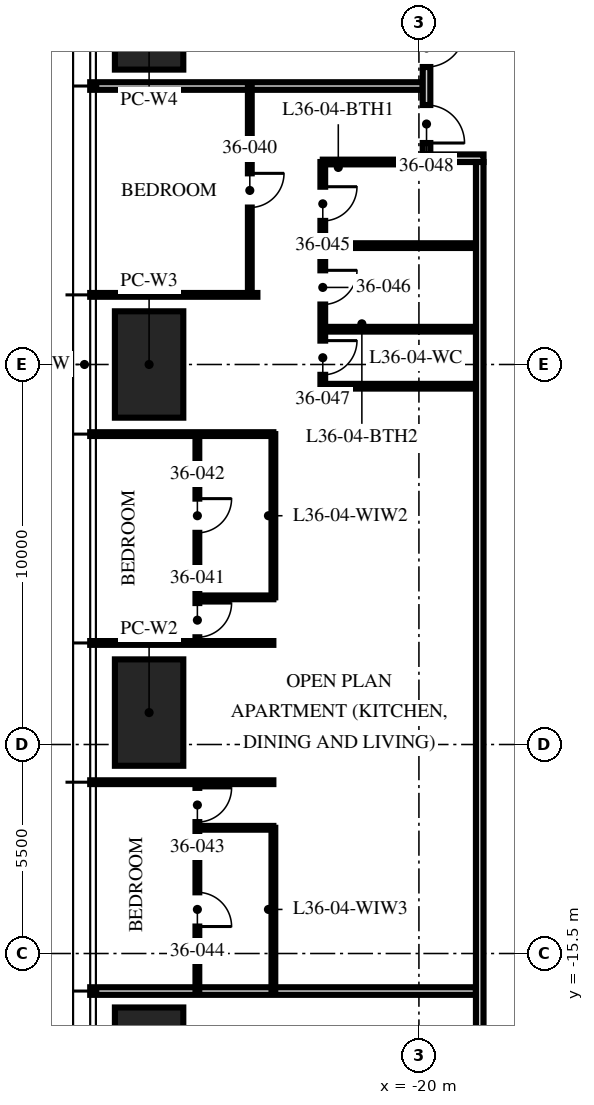
"""IFC4 building model, lengths in metres.
Left out: names, types, materials, properties, quantities, classifications, styles, units other than length and angle.
Written with IfcOpenShell. Run it as: python <this file> out.ifc"""

import sys

from ifc_helpers import new_model, si_unit, direction, frame, frame_2d, origin, origin_2d, place, context, subcontext, project, spatial, rectangle, extrude, element, fill, save


model = new_model("IFC4")
c1 = context("Model", 3, precision=1e-05, world=origin(), true_north=direction((0.0, 1.0)))
c2 = subcontext(c1, "Body", "Model", "MODEL_VIEW")
j1 = project(units=[si_unit("LENGTHUNIT", "METRE"), si_unit("PLANEANGLEUNIT", "RADIAN")], contexts=[c1])
p1 = place(None, origin())
s1 = spatial("IfcSite", under=j1, at=p1, CompositionType="ELEMENT")
p2 = place(p1, origin())
s2 = spatial("IfcBuilding", under=s1, at=p2, CompositionType="ELEMENT")
p3 = place(p2, frame((0.0, 0.0, 144.75)))
s3 = spatial("IfcBuildingStorey", under=s2, at=p3, CompositionType="ELEMENT", Elevation=144.75)
for number, where, z_axis, x_axis in (
    (1, (-27.1, -18.32, 0.0), (0.0, 0.0, 1.0), (0.0, 1.0, 0.0)),
    (2, (-27.1, -9.16, 0.0), (0.0, 0.0, 1.0), (0.0, 1.0, 0.0)),
    (3, (-27.1, 0.0, 0.0), (0.0, 0.0, 1.0), (0.0, 1.0, 0.0)),
    (4, (-27.1, 9.16, 0.0), (0.0, 0.0, 1.0), (0.0, 1.0, 0.0)),
):
    element("IfcColumn", number, at=place(p3, frame(where, z_axis=z_axis, x_axis=x_axis)), inside=s3, PredefinedType="COLUMN", context=c2, shape_type="SweptSolid", body=[
        extrude(rectangle(XDim=2.8, YDim=1.8, at=origin_2d()), origin(), (0.0, 0.0, 1.0), 3.75),
    ])
p4 = place(p3, frame((-19.9, 7.328, 0.0), z_axis=(0.0, 0.0, 1.0), x_axis=(-1.0, 0.0, 0.0)))
e5 = element("IfcWall", 5, at=p4, inside=s3, PredefinedType="PARTITIONING", context=c2, shape_type="SweptSolid", body=[
    extrude(rectangle(XDim=8.75, YDim=0.2, at=frame_2d((4.375, 0.0))), origin(), (0.0, 0.0, 1.0), 2.81),
])
p5 = place(p3, frame((-24.25, 1.832, 0.0), z_axis=(0.0, 0.0, 1.0), x_axis=(-1.0, 0.0, 0.0)))
e6 = element("IfcWall", 6, at=p5, inside=s3, PredefinedType="PARTITIONING", context=c2, shape_type="SweptSolid", body=[
    extrude(rectangle(XDim=4.4, YDim=0.1, at=frame_2d((2.2, 0.0))), origin(), (0.0, 0.0, 1.0), 2.81),
])
for number, where, z_axis, x_axis in (
    (7, (-23.83, -1.832, 0.0), (0.0, 0.0, 1.0), (-1.0, 0.0, 0.0)),
    (8, (-23.83, -7.328, 0.0), (0.0, 0.0, 1.0), (-1.0, 0.0, 0.0)),
    (9, (-23.83, -10.992, 0.0), (0.0, 0.0, 1.0), (-1.0, 0.0, 0.0)),
):
    element("IfcWall", number, at=place(p3, frame(where, z_axis=z_axis, x_axis=x_axis)), inside=s3, PredefinedType="PARTITIONING", context=c2, shape_type="SweptSolid", body=[
        extrude(rectangle(XDim=4.82, YDim=0.1, at=frame_2d((2.41, 0.0))), origin(), (0.0, 0.0, 1.0), 2.81),
    ])
p6 = place(p3, frame((-18.5, -16.488, 0.0), z_axis=(0.0, 0.0, 1.0), x_axis=(-1.0, 0.0, 0.0)))
e10 = element("IfcWall", 10, at=p6, inside=s3, PredefinedType="PARTITIONING", context=c2, shape_type="SweptSolid", body=[
    extrude(rectangle(XDim=10.15, YDim=0.2, at=frame_2d((5.075, 0.0))), origin(), (0.0, 0.0, 1.0), 2.81),
])
p7 = place(p3, frame((-24.45, 7.328, 0.0), z_axis=(0.0, 0.0, 1.0), x_axis=(0.0, -1.0, 0.0)))
e11 = element("IfcWall", 11, at=p7, inside=s3, PredefinedType="PARTITIONING", context=c2, shape_type="SweptSolid", body=[
    extrude(rectangle(XDim=5.496, YDim=0.1, at=frame_2d((2.748, 0.0))), origin(), (0.0, 0.0, 1.0), 2.81),
])
p8 = place(p7, frame((2.298, 0.0, 0.0)))
e12 = element("IfcOpeningElement", 12, at=p8, cuts=e11, PredefinedType="OPENING", context=c2, shape_type="SweptSolid", body=[
    extrude(rectangle(XDim=0.9, YDim=2.1, at=frame_2d((0.45, 1.05))), frame((0.0, 0.06, 0.0), z_axis=(0.0, -1.0, 0.0), x_axis=(1.0, 0.0, 0.0)), (0.0, 0.0, 1.0), 0.12),
])
p9 = place(p3, frame((-25.83, -1.832, 0.0), z_axis=(0.0, 0.0, 1.0), x_axis=(0.0, -1.0, 0.0)))
e13 = element("IfcWall", 13, at=p9, inside=s3, PredefinedType="PARTITIONING", context=c2, shape_type="SweptSolid", body=[
    extrude(rectangle(XDim=5.496, YDim=0.1, at=frame_2d((2.748, 0.0))), origin(), (0.0, 0.0, 1.0), 2.81),
])
p10 = place(p9, frame((4.446, 0.0, 0.0)))
e14 = element("IfcOpeningElement", 14, at=p10, cuts=e13, PredefinedType="OPENING", context=c2, shape_type="SweptSolid", body=[
    extrude(rectangle(XDim=0.9, YDim=2.1, at=frame_2d((0.45, 1.05))), frame((0.0, 0.06, 0.0), z_axis=(0.0, -1.0, 0.0), x_axis=(1.0, 0.0, 0.0)), (0.0, 0.0, 1.0), 0.12),
])
p11 = place(p9, frame((1.698, 0.0, 0.0)))
e15 = element("IfcOpeningElement", 15, at=p11, cuts=e13, PredefinedType="OPENING", context=c2, shape_type="SweptSolid", body=[
    extrude(rectangle(XDim=0.9, YDim=2.1, at=frame_2d((0.45, 1.05))), frame((0.0, 0.06, 0.0), z_axis=(0.0, -1.0, 0.0), x_axis=(1.0, 0.0, 0.0)), (0.0, 0.0, 1.0), 0.12),
])
p12 = place(p3, frame((-23.83, -6.128, 0.0), z_axis=(0.0, 0.0, 1.0), x_axis=(-1.0, 0.0, 0.0)))
e16 = element("IfcWall", 16, at=p12, inside=s3, PredefinedType="PARTITIONING", context=c2, shape_type="SweptSolid", body=[
    extrude(rectangle(XDim=2.0, YDim=0.1, at=frame_2d((1.0, 0.0))), origin(), (0.0, 0.0, 1.0), 3.5),
])
p13 = place(p3, frame((-23.83, -1.832, 0.0), z_axis=(0.0, 0.0, 1.0), x_axis=(0.0, -1.0, 0.0)))
e17 = element("IfcWall", 17, at=p13, inside=s3, PredefinedType="PARTITIONING", context=c2, shape_type="SweptSolid", body=[
    extrude(rectangle(XDim=4.296, YDim=0.1, at=frame_2d((2.148, 0.0))), origin(), (0.0, 0.0, 1.0), 2.81),
])
p14 = place(p3, frame((-25.83, -10.992, 0.0), z_axis=(0.0, 0.0, 1.0), x_axis=(0.0, -1.0, 0.0)))
e18 = element("IfcWall", 18, at=p14, inside=s3, PredefinedType="PARTITIONING", context=c2, shape_type="SweptSolid", body=[
    extrude(rectangle(XDim=5.496, YDim=0.1, at=frame_2d((2.748, 0.0))), origin(), (0.0, 0.0, 1.0), 2.81),
])
p15 = place(p14, frame((0.15, 0.0, 0.0)))
e19 = element("IfcOpeningElement", 19, at=p15, cuts=e18, PredefinedType="OPENING", context=c2, shape_type="SweptSolid", body=[
    extrude(rectangle(XDim=0.9, YDim=2.1, at=frame_2d((0.45, 1.05))), frame((0.0, 0.06, 0.0), z_axis=(0.0, -1.0, 0.0), x_axis=(1.0, 0.0, 0.0)), (0.0, 0.0, 1.0), 0.12),
])
p16 = place(p14, frame((2.898, 0.0, 0.0)))
e20 = element("IfcOpeningElement", 20, at=p16, cuts=e18, PredefinedType="OPENING", context=c2, shape_type="SweptSolid", body=[
    extrude(rectangle(XDim=0.9, YDim=2.1, at=frame_2d((0.45, 1.05))), frame((0.0, 0.06, 0.0), z_axis=(0.0, -1.0, 0.0), x_axis=(1.0, 0.0, 0.0)), (0.0, 0.0, 1.0), 0.12),
])
p17 = place(p3, frame((-23.83, -12.192, 0.0), z_axis=(0.0, 0.0, 1.0), x_axis=(-1.0, 0.0, 0.0)))
e21 = element("IfcWall", 21, at=p17, inside=s3, PredefinedType="PARTITIONING", context=c2, shape_type="SweptSolid", body=[
    extrude(rectangle(XDim=2.0, YDim=0.1, at=frame_2d((1.0, 0.0))), origin(), (0.0, 0.0, 1.0), 3.5),
])
p18 = place(p3, frame((-23.83, -12.192, 0.0), z_axis=(0.0, 0.0, 1.0), x_axis=(0.0, -1.0, 0.0)))
e22 = element("IfcWall", 22, at=p18, inside=s3, PredefinedType="PARTITIONING", context=c2, shape_type="SweptSolid", body=[
    extrude(rectangle(XDim=4.296, YDim=0.1, at=frame_2d((2.148, 0.0))), origin(), (0.0, 0.0, 1.0), 2.81),
])
p19 = place(p3, frame((-22.53, 5.328, 0.0), z_axis=(0.0, 0.0, 1.0), x_axis=(0.0, -1.0, 0.0)))
e23 = element("IfcWall", 23, at=p19, inside=s3, PredefinedType="PARTITIONING", context=c2, shape_type="SweptSolid", body=[
    extrude(rectangle(XDim=5.9, YDim=0.125, at=frame_2d((2.95, 0.0))), origin(), (0.0, 0.0, 1.0), 2.7),
])
p20 = place(p19, frame((0.65, 0.0, 0.0)))
e24 = element("IfcOpeningElement", 24, at=p20, cuts=e23, PredefinedType="OPENING", context=c2, shape_type="SweptSolid", body=[
    extrude(rectangle(XDim=0.9, YDim=2.1, at=frame_2d((0.45, 1.05))), frame((0.0, 0.073, 0.0), z_axis=(0.0, -1.0, 0.0), x_axis=(1.0, 0.0, 0.0)), (0.0, 0.0, 1.0), 0.145),
])
p21 = place(p19, frame((2.85, 0.0, 0.0)))
e25 = element("IfcOpeningElement", 25, at=p21, cuts=e23, PredefinedType="OPENING", context=c2, shape_type="SweptSolid", body=[
    extrude(rectangle(XDim=0.9, YDim=2.1, at=frame_2d((0.45, 1.05))), frame((0.0, 0.073, 0.0), z_axis=(0.0, -1.0, 0.0), x_axis=(1.0, 0.0, 0.0)), (0.0, 0.0, 1.0), 0.145),
])
p22 = place(p19, frame((4.7, 0.0, 0.0)))
e26 = element("IfcOpeningElement", 26, at=p22, cuts=e23, PredefinedType="OPENING", context=c2, shape_type="SweptSolid", body=[
    extrude(rectangle(XDim=0.9, YDim=2.1, at=frame_2d((0.45, 1.05))), frame((0.0, 0.073, 0.0), z_axis=(0.0, -1.0, 0.0), x_axis=(1.0, 0.0, 0.0)), (0.0, 0.0, 1.0), 0.145),
])
p23 = place(p3, frame((-19.97, 5.328, 0.0), z_axis=(0.0, 0.0, 1.0), x_axis=(-1.0, 0.0, 0.0)))
e27 = element("IfcWall", 27, at=p23, inside=s3, PredefinedType="PARTITIONING", context=c2, shape_type="SweptSolid", body=[
    extrude(rectangle(XDim=2.56, YDim=0.125, at=frame_2d((1.28, 0.0))), origin(), (0.0, 0.0, 1.0), 3.5),
])
for number, where, z_axis, x_axis in (
    (28, (-18.5, 3.128, 0.0), (0.0, 0.0, 1.0), (-1.0, 0.0, 0.0)),
    (29, (-18.5, 0.928, 0.0), (0.0, 0.0, 1.0), (-1.0, 0.0, 0.0)),
    (30, (-18.5, -0.572, 0.0), (0.0, 0.0, 1.0), (-1.0, 0.0, 0.0)),
):
    element("IfcWall", number, at=place(p3, frame(where, z_axis=z_axis, x_axis=x_axis)), inside=s3, PredefinedType="PARTITIONING", context=c2, shape_type="SweptSolid", body=[
        extrude(rectangle(XDim=4.03, YDim=0.125, at=frame_2d((2.015, 0.0))), origin(), (0.0, 0.0, 1.0), 3.5),
    ])
p24 = place(p3, frame((-18.3, 5.428, 0.0), z_axis=(0.0, 0.0, 1.0), x_axis=(-1.0, 0.0, 0.0)))
e31 = element("IfcWall", 31, at=p24, inside=s3, PredefinedType="PARTITIONING", context=c2, shape_type="SweptSolid", body=[
    extrude(rectangle(XDim=1.6, YDim=0.2, at=frame_2d((0.8, 0.0))), origin(), (0.0, 0.0, 1.0), 3.5),
])
p25 = place(p3, frame((-19.8, 9.128, 0.0), z_axis=(0.0, 0.0, 1.0), x_axis=(0.0, -1.0, 0.0)))
e32 = element("IfcWall", 32, at=p25, inside=s3, PredefinedType="PARTITIONING", context=c2, shape_type="SweptSolid", body=[
    extrude(rectangle(XDim=3.6, YDim=0.2, at=frame_2d((1.8, 0.0))), origin(), (0.0, 0.0, 1.0), 2.7),
])
p26 = place(p25, frame((0.3, 0.0, 0.0)))
e33 = element("IfcOpeningElement", 33, at=p26, cuts=e32, PredefinedType="OPENING", context=c2, shape_type="SweptSolid", body=[
    extrude(rectangle(XDim=1.0, YDim=2.2, at=frame_2d((0.5, 1.1))), frame((0.0, 0.11, 0.0), z_axis=(0.0, -1.0, 0.0), x_axis=(1.0, 0.0, 0.0)), (0.0, 0.0, 1.0), 0.22),
])
p27 = place(p25, frame((2.3, 0.0, 0.0)))
e34 = element("IfcOpeningElement", 34, at=p27, cuts=e32, PredefinedType="OPENING", context=c2, shape_type="SweptSolid", body=[
    extrude(rectangle(XDim=1.0, YDim=2.2, at=frame_2d((0.5, 1.1))), frame((0.0, 0.11, 0.0), z_axis=(0.0, -1.0, 0.0), x_axis=(1.0, 0.0, 0.0)), (0.0, 0.0, 1.0), 0.22),
])
p28 = place(p3, frame((-18.4, 5.328, 0.0), z_axis=(0.0, 0.0, 1.0), x_axis=(0.0, -1.0, 0.0)))
e35 = element("IfcWall", 35, at=p28, inside=s3, PredefinedType="PARTITIONING", context=c2, shape_type="SweptSolid", body=[
    extrude(rectangle(XDim=23.628, YDim=0.2, at=frame_2d((11.814, 0.0))), origin(), (0.0, 0.0, 1.0), 2.3),
])
p29 = place(p26, origin())
e36 = element("IfcDoor", 36, at=p29, inside=s3, OperationType="SINGLE_SWING_LEFT", PredefinedType="DOOR", context=c2, shape_type="SweptSolid", body=[
    extrude(rectangle(XDim=1.0, YDim=2.2, at=frame_2d((0.5, 1.1))), frame((0.0, 0.025, 0.0), z_axis=(0.0, -1.0, 0.0), x_axis=(1.0, 0.0, 0.0)), (0.0, 0.0, 1.0), 0.05),
])
fill(e33, e36)
p30 = place(p8, origin())
e37 = element("IfcDoor", 37, at=p30, inside=s3, OperationType="SINGLE_SWING_LEFT", PredefinedType="DOOR", context=c2, shape_type="SweptSolid", body=[
    extrude(rectangle(XDim=0.9, YDim=2.1, at=frame_2d((0.45, 1.05))), frame((0.0, 0.025, 0.0), z_axis=(0.0, -1.0, 0.0), x_axis=(1.0, 0.0, 0.0)), (0.0, 0.0, 1.0), 0.05),
])
fill(e12, e37)
p31 = place(p10, origin())
e38 = element("IfcDoor", 38, at=p31, inside=s3, OperationType="SINGLE_SWING_LEFT", PredefinedType="DOOR", context=c2, shape_type="SweptSolid", body=[
    extrude(rectangle(XDim=0.9, YDim=2.1, at=frame_2d((0.45, 1.05))), frame((0.0, 0.025, 0.0), z_axis=(0.0, -1.0, 0.0), x_axis=(1.0, 0.0, 0.0)), (0.0, 0.0, 1.0), 0.05),
])
fill(e14, e38)
p32 = place(p11, origin())
e39 = element("IfcDoor", 39, at=p32, inside=s3, OperationType="SINGLE_SWING_LEFT", PredefinedType="DOOR", context=c2, shape_type="SweptSolid", body=[
    extrude(rectangle(XDim=0.9, YDim=2.1, at=frame_2d((0.45, 1.05))), frame((0.0, 0.025, 0.0), z_axis=(0.0, -1.0, 0.0), x_axis=(1.0, 0.0, 0.0)), (0.0, 0.0, 1.0), 0.05),
])
fill(e15, e39)
p33 = place(p15, origin())
e40 = element("IfcDoor", 40, at=p33, inside=s3, OperationType="SINGLE_SWING_LEFT", PredefinedType="DOOR", context=c2, shape_type="SweptSolid", body=[
    extrude(rectangle(XDim=0.9, YDim=2.1, at=frame_2d((0.45, 1.05))), frame((0.0, 0.025, 0.0), z_axis=(0.0, -1.0, 0.0), x_axis=(1.0, 0.0, 0.0)), (0.0, 0.0, 1.0), 0.05),
])
fill(e19, e40)
p34 = place(p16, origin())
e41 = element("IfcDoor", 41, at=p34, inside=s3, OperationType="SINGLE_SWING_RIGHT", PredefinedType="DOOR", context=c2, shape_type="SweptSolid", body=[
    extrude(rectangle(XDim=0.9, YDim=2.1, at=frame_2d((0.45, 1.05))), frame((0.0, 0.025, 0.0), z_axis=(0.0, -1.0, 0.0), x_axis=(1.0, 0.0, 0.0)), (0.0, 0.0, 1.0), 0.05),
])
fill(e20, e41)
p35 = place(p20, origin())
e42 = element("IfcDoor", 42, at=p35, inside=s3, OperationType="SINGLE_SWING_LEFT", PredefinedType="DOOR", context=c2, shape_type="SweptSolid", body=[
    extrude(rectangle(XDim=0.9, YDim=2.1, at=frame_2d((0.45, 1.05))), frame((0.0, 0.025, 0.0), z_axis=(0.0, -1.0, 0.0), x_axis=(1.0, 0.0, 0.0)), (0.0, 0.0, 1.0), 0.05),
])
fill(e24, e42)
p36 = place(p21, origin())
e43 = element("IfcDoor", 43, at=p36, inside=s3, OperationType="SINGLE_SWING_LEFT", PredefinedType="DOOR", context=c2, shape_type="SweptSolid", body=[
    extrude(rectangle(XDim=0.9, YDim=2.1, at=frame_2d((0.45, 1.05))), frame((0.0, 0.025, 0.0), z_axis=(0.0, -1.0, 0.0), x_axis=(1.0, 0.0, 0.0)), (0.0, 0.0, 1.0), 0.05),
])
fill(e25, e43)
p37 = place(p22, origin())
e44 = element("IfcDoor", 44, at=p37, inside=s3, OperationType="SINGLE_SWING_LEFT", PredefinedType="DOOR", context=c2, shape_type="SweptSolid", body=[
    extrude(rectangle(XDim=0.9, YDim=2.1, at=frame_2d((0.45, 1.05))), frame((0.0, 0.025, 0.0), z_axis=(0.0, -1.0, 0.0), x_axis=(1.0, 0.0, 0.0)), (0.0, 0.0, 1.0), 0.05),
])
fill(e26, e44)
p38 = place(p27, origin())
e45 = element("IfcDoor", 45, at=p38, inside=s3, OperationType="SINGLE_SWING_RIGHT", PredefinedType="DOOR", context=c2, shape_type="SweptSolid", body=[
    extrude(rectangle(XDim=1.0, YDim=2.2, at=frame_2d((0.5, 1.1))), frame((0.0, 0.025, 0.0), z_axis=(0.0, -1.0, 0.0), x_axis=(1.0, 0.0, 0.0)), (0.0, 0.0, 1.0), 0.05),
])
fill(e34, e45)
save(model, sys.argv[1])
